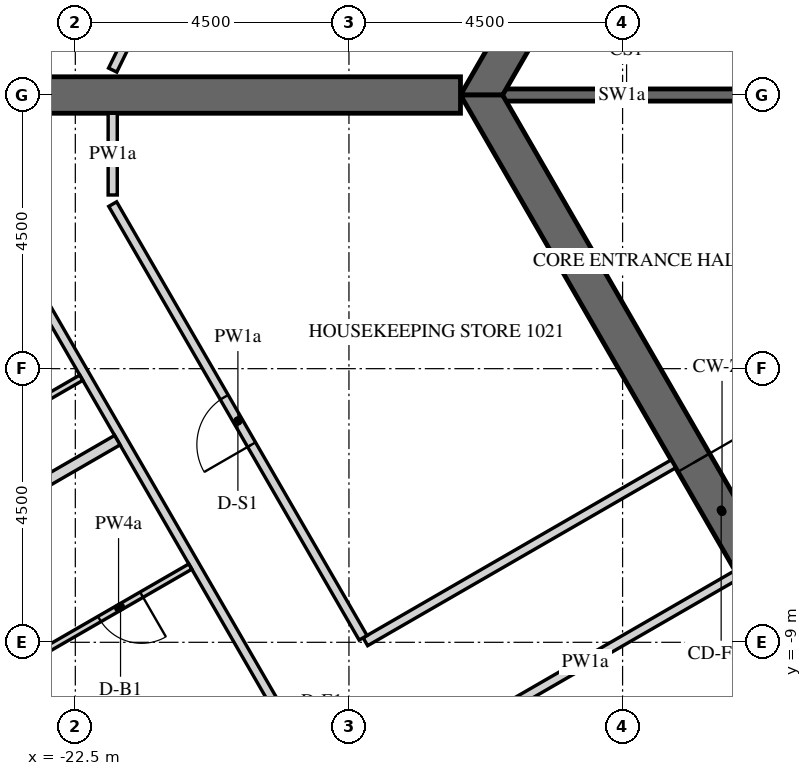
"""IFC4 building model, lengths in metres.
Left out: names, types, materials, properties, quantities, classifications, styles, units other than length and angle.
Written with IfcOpenShell. Run it as: python <this file> out.ifc"""

import sys

from ifc_helpers import new_model, si_unit, direction, frame, frame_2d, origin, place, context, subcontext, project, spatial, polyline, rectangle, outline, extrude, element, fill, save


model = new_model("IFC4")
c1 = context("Model", 3, precision=1e-05, world=origin(), true_north=direction((0.0, 1.0)))
c2 = subcontext(c1, "Body", "Model", "MODEL_VIEW")
j1 = project(units=[si_unit("LENGTHUNIT", "METRE"), si_unit("PLANEANGLEUNIT", "RADIAN")], contexts=[c1])
p1 = place(None, origin())
s1 = spatial("IfcSite", under=j1, at=p1, CompositionType="ELEMENT")
p2 = place(p1, origin())
s2 = spatial("IfcBuilding", under=s1, at=p2, CompositionType="ELEMENT")
p3 = place(p2, frame((0.0, 0.0, 135.0)))
s3 = spatial("IfcBuildingStorey", under=s2, at=p3, CompositionType="ELEMENT", Elevation=135.0)
p4 = place(p3, frame((-19.595, 27.633, -0.15), z_axis=(0.0, 0.0, 1.0), x_axis=(-0.438368285794, -0.898795441694, 0.0)))
e1 = element("IfcWall", 1, at=p4, inside=s3, PredefinedType="SOLIDWALL", context=c2, shape_type="SweptSolid", body=[
    extrude(outline(polyline([(-0.026, -0.275), (30.093, -0.275), (30.048, 0.275), (0.026, 0.275), (-0.026, -0.275)])), origin(), (0.0, 0.0, 1.0), 3.9),
])
p5 = place(p4, frame((1.236, 0.0, 1.05)))
e2 = element("IfcOpeningElement", 2, at=p5, cuts=e1, PredefinedType="OPENING", context=c2, shape_type="SweptSolid", body=[
    extrude(rectangle(XDim=2.4, YDim=2.4, at=frame_2d((1.2, 1.2))), frame((0.0, 0.285, 0.0), z_axis=(0.0, -1.0, 0.0), x_axis=(1.0, 0.0, 0.0)), (0.0, 0.0, 1.0), 0.57),
])
p6 = place(p4, frame((4.835, 0.0, 1.05)))
e3 = element("IfcOpeningElement", 3, at=p6, cuts=e1, PredefinedType="OPENING", context=c2, shape_type="SweptSolid", body=[
    extrude(rectangle(XDim=2.4, YDim=2.4, at=frame_2d((1.2, 1.2))), frame((0.0, 0.285, 0.0), z_axis=(0.0, -1.0, 0.0), x_axis=(1.0, 0.0, 0.0)), (0.0, 0.0, 1.0), 0.57),
])
p7 = place(p4, frame((8.436, 0.0, 1.05)))
e4 = element("IfcOpeningElement", 4, at=p7, cuts=e1, PredefinedType="OPENING", context=c2, shape_type="SweptSolid", body=[
    extrude(rectangle(XDim=2.4, YDim=2.4, at=frame_2d((1.2, 1.2))), frame((0.0, 0.285, 0.0), z_axis=(0.0, -1.0, 0.0), x_axis=(1.0, 0.0, 0.0)), (0.0, 0.0, 1.0), 0.57),
])
p8 = place(p4, frame((12.035, 0.0, 1.05)))
e5 = element("IfcOpeningElement", 5, at=p8, cuts=e1, PredefinedType="OPENING", context=c2, shape_type="SweptSolid", body=[
    extrude(rectangle(XDim=2.4, YDim=2.4, at=frame_2d((1.2, 1.2))), frame((0.0, 0.285, 0.0), z_axis=(0.0, -1.0, 0.0), x_axis=(1.0, 0.0, 0.0)), (0.0, 0.0, 1.0), 0.57),
])
p9 = place(p4, frame((15.635, 0.0, 1.05)))
e6 = element("IfcOpeningElement", 6, at=p9, cuts=e1, PredefinedType="OPENING", context=c2, shape_type="SweptSolid", body=[
    extrude(rectangle(XDim=2.4, YDim=2.4, at=frame_2d((1.2, 1.2))), frame((0.0, 0.285, 0.0), z_axis=(0.0, -1.0, 0.0), x_axis=(1.0, 0.0, 0.0)), (0.0, 0.0, 1.0), 0.57),
])
p10 = place(p4, frame((19.236, 0.0, 1.05)))
e7 = element("IfcOpeningElement", 7, at=p10, cuts=e1, PredefinedType="OPENING", context=c2, shape_type="SweptSolid", body=[
    extrude(rectangle(XDim=2.4, YDim=2.4, at=frame_2d((1.2, 1.2))), frame((0.0, 0.285, 0.0), z_axis=(0.0, -1.0, 0.0), x_axis=(1.0, 0.0, 0.0)), (0.0, 0.0, 1.0), 0.57),
])
p11 = place(p4, frame((22.835, 0.0, 1.05)))
e8 = element("IfcOpeningElement", 8, at=p11, cuts=e1, PredefinedType="OPENING", context=c2, shape_type="SweptSolid", body=[
    extrude(rectangle(XDim=2.4, YDim=2.4, at=frame_2d((1.2, 1.2))), frame((0.0, 0.285, 0.0), z_axis=(0.0, -1.0, 0.0), x_axis=(1.0, 0.0, 0.0)), (0.0, 0.0, 1.0), 0.57),
])
p12 = place(p4, frame((26.436, 0.0, 1.05)))
e9 = element("IfcOpeningElement", 9, at=p12, cuts=e1, PredefinedType="OPENING", context=c2, shape_type="SweptSolid", body=[
    extrude(rectangle(XDim=2.4, YDim=2.4, at=frame_2d((1.2, 1.2))), frame((0.0, 0.285, 0.0), z_axis=(0.0, -1.0, 0.0), x_axis=(1.0, 0.0, 0.0)), (0.0, 0.0, 1.0), 0.57),
])
p13 = place(p3, frame((-32.655, -2.89, -0.15), z_axis=(0.0, 0.0, 1.0), x_axis=(0.499997711317, -0.866026725152, 0.0)))
e10 = element("IfcWall", 10, at=p13, inside=s3, PredefinedType="SOLIDWALL", context=c2, shape_type="SweptSolid", body=[
    extrude(outline(polyline([(-0.022, -0.275), (30.097, -0.275), (30.045, 0.275), (0.022, 0.275), (-0.022, -0.275)])), origin(), (0.0, 0.0, 1.0), 3.9),
])
p14 = place(p13, frame((1.236, 0.0, 1.05)))
e11 = element("IfcOpeningElement", 11, at=p14, cuts=e10, PredefinedType="OPENING", context=c2, shape_type="SweptSolid", body=[
    extrude(rectangle(XDim=2.4, YDim=2.4, at=frame_2d((1.2, 1.2))), frame((0.0, 0.285, 0.0), z_axis=(0.0, -1.0, 0.0), x_axis=(1.0, 0.0, 0.0)), (0.0, 0.0, 1.0), 0.57),
])
p15 = place(p13, frame((4.835, 0.0, 1.05)))
e12 = element("IfcOpeningElement", 12, at=p15, cuts=e10, PredefinedType="OPENING", context=c2, shape_type="SweptSolid", body=[
    extrude(rectangle(XDim=2.4, YDim=2.4, at=frame_2d((1.2, 1.2))), frame((0.0, 0.285, 0.0), z_axis=(0.0, -1.0, 0.0), x_axis=(1.0, 0.0, 0.0)), (0.0, 0.0, 1.0), 0.57),
])
p16 = place(p13, frame((8.436, 0.0, 1.05)))
e13 = element("IfcOpeningElement", 13, at=p16, cuts=e10, PredefinedType="OPENING", context=c2, shape_type="SweptSolid", body=[
    extrude(rectangle(XDim=2.4, YDim=2.4, at=frame_2d((1.2, 1.2))), frame((0.0, 0.285, 0.0), z_axis=(0.0, -1.0, 0.0), x_axis=(1.0, 0.0, 0.0)), (0.0, 0.0, 1.0), 0.57),
])
p17 = place(p13, frame((12.035, 0.0, 1.05)))
e14 = element("IfcOpeningElement", 14, at=p17, cuts=e10, PredefinedType="OPENING", context=c2, shape_type="SweptSolid", body=[
    extrude(rectangle(XDim=2.4, YDim=2.4, at=frame_2d((1.2, 1.2))), frame((0.0, 0.285, 0.0), z_axis=(0.0, -1.0, 0.0), x_axis=(1.0, 0.0, 0.0)), (0.0, 0.0, 1.0), 0.57),
])
p18 = place(p13, frame((15.635, 0.0, 1.05)))
e15 = element("IfcOpeningElement", 15, at=p18, cuts=e10, PredefinedType="OPENING", context=c2, shape_type="SweptSolid", body=[
    extrude(rectangle(XDim=2.4, YDim=2.4, at=frame_2d((1.2, 1.2))), frame((0.0, 0.285, 0.0), z_axis=(0.0, -1.0, 0.0), x_axis=(1.0, 0.0, 0.0)), (0.0, 0.0, 1.0), 0.57),
])
p19 = place(p13, frame((19.236, 0.0, 1.05)))
e16 = element("IfcOpeningElement", 16, at=p19, cuts=e10, PredefinedType="OPENING", context=c2, shape_type="SweptSolid", body=[
    extrude(rectangle(XDim=2.4, YDim=2.4, at=frame_2d((1.2, 1.2))), frame((0.0, 0.285, 0.0), z_axis=(0.0, -1.0, 0.0), x_axis=(1.0, 0.0, 0.0)), (0.0, 0.0, 1.0), 0.57),
])
p20 = place(p13, frame((22.835, 0.0, 1.05)))
e17 = element("IfcOpeningElement", 17, at=p20, cuts=e10, PredefinedType="OPENING", context=c2, shape_type="SweptSolid", body=[
    extrude(rectangle(XDim=2.4, YDim=2.4, at=frame_2d((1.2, 1.2))), frame((0.0, 0.285, 0.0), z_axis=(0.0, -1.0, 0.0), x_axis=(1.0, 0.0, 0.0)), (0.0, 0.0, 1.0), 0.57),
])
p21 = place(p13, frame((26.436, 0.0, 1.05)))
e18 = element("IfcOpeningElement", 18, at=p21, cuts=e10, PredefinedType="OPENING", context=c2, shape_type="SweptSolid", body=[
    extrude(rectangle(XDim=2.4, YDim=2.4, at=frame_2d((1.2, 1.2))), frame((0.0, 0.285, 0.0), z_axis=(0.0, -1.0, 0.0), x_axis=(1.0, 0.0, 0.0)), (0.0, 0.0, 1.0), 0.57),
])
p22 = place(p3, frame((-7.91, 13.7, -0.15), z_axis=(0.0, 0.0, 1.0), x_axis=(-0.499999880136, -0.866025472988, 0.0)))
e19 = element("IfcWall", 19, at=p22, inside=s3, PredefinedType="SHEAR", context=c2, shape_type="SweptSolid", body=[
    extrude(outline(polyline([(-0.173, -0.3), (15.993, -0.3), (15.646, 0.3), (0.173, 0.3), (-0.173, -0.3)])), origin(), (0.0, 0.0, 1.0), 3.9),
])
p23 = place(p22, frame((7.039, 0.0, 0.15)))
e20 = element("IfcOpeningElement", 20, at=p23, cuts=e19, PredefinedType="OPENING", context=c2, shape_type="SweptSolid", body=[
    extrude(rectangle(XDim=1.8, YDim=2.4, at=frame_2d((0.9, 1.2))), frame((0.0, 0.31, 0.0), z_axis=(0.0, -1.0, 0.0), x_axis=(1.0, 0.0, 0.0)), (0.0, 0.0, 1.0), 0.62),
])
p24 = place(p3, frame((-15.819, 0.0, -0.15), z_axis=(0.0, 0.0, 1.0), x_axis=(0.499999880136, -0.866025472988, 0.0)))
e21 = element("IfcWall", 21, at=p24, inside=s3, PredefinedType="SHEAR", context=c2, shape_type="SweptSolid", body=[
    extrude(outline(polyline([(-0.173, -0.3), (15.993, -0.3), (15.646, 0.3), (0.173, 0.3), (-0.173, -0.3)])), origin(), (0.0, 0.0, 1.0), 3.9),
])
p25 = place(p24, frame((6.981, 0.0, 0.15)))
e22 = element("IfcOpeningElement", 22, at=p25, cuts=e21, PredefinedType="OPENING", context=c2, shape_type="SweptSolid", body=[
    extrude(rectangle(XDim=1.8, YDim=2.4, at=frame_2d((0.9, 1.2))), frame((0.0, 0.31, 0.0), z_axis=(0.0, -1.0, 0.0), x_axis=(1.0, 0.0, 0.0)), (0.0, 0.0, 1.0), 0.62),
])
p26 = place(p3, frame((-16.166, 0.0, -0.15), z_axis=(0.0, 0.0, 1.0), x_axis=(-1.0, 0.0, 0.0)))
e23 = element("IfcWall", 23, at=p26, inside=s3, PredefinedType="SHEAR", context=c2, shape_type="SweptSolid", body=[
    extrude(rectangle(XDim=16.509, YDim=0.6, at=frame_2d((8.254, 0.0))), origin(), (0.0, 0.0, 1.0), 3.9),
])
p27 = place(p26, frame((7.354, 0.0, 0.15)))
e24 = element("IfcOpeningElement", 24, at=p27, cuts=e23, PredefinedType="OPENING", context=c2, shape_type="SweptSolid", body=[
    extrude(rectangle(XDim=1.8, YDim=2.4, at=frame_2d((0.9, 1.2))), frame((0.0, 0.31, 0.0), z_axis=(0.0, -1.0, 0.0), x_axis=(1.0, 0.0, 0.0)), (0.0, 0.0, 1.0), 0.62),
])
p28 = place(p3, frame((-11.547, 0.0, -0.15), z_axis=(0.0, 0.0, 1.0), x_axis=(-1.0, 0.0, 0.0)))
e25 = element("IfcWall", 25, at=p28, inside=s3, PredefinedType="SHEAR", context=c2, shape_type="SweptSolid", body=[
    extrude(rectangle(XDim=3.926, YDim=0.2, at=frame_2d((1.963, 0.0))), origin(), (0.0, 0.0, 1.0), 3.9),
])
p29 = place(p3, frame((-21.885, 0.41, 0.0), z_axis=(0.0, 0.0, 1.0), x_axis=(0.43837064471, 0.898794291179, 0.0)))
e26 = element("IfcWall", 26, at=p29, inside=s3, PredefinedType="PARTITIONING", context=c2, shape_type="SweptSolid", body=[
    extrude(rectangle(XDim=9.532, YDim=0.15, at=frame_2d((4.766, 0.0))), origin(), (0.0, 0.0, 1.0), 2.838),
])
p30 = place(p29, frame((4.316, 0.0, 0.0)))
e27 = element("IfcOpeningElement", 27, at=p30, cuts=e26, PredefinedType="OPENING", context=c2, shape_type="SweptSolid", body=[
    extrude(rectangle(XDim=0.9, YDim=2.1, at=frame_2d((0.45, 1.05))), frame((0.0, 0.085, 0.0), z_axis=(0.0, -1.0, 0.0), x_axis=(1.0, 0.0, 0.0)), (0.0, 0.0, 1.0), 0.17),
])
p31 = place(p3, frame((-23.743, -2.175, 0.0), z_axis=(0.0, 0.0, 1.0), x_axis=(0.499992353047, -0.86602981871, 0.0)))
e28 = element("IfcWall", 28, at=p31, inside=s3, PredefinedType="PARTITIONING", context=c2, shape_type="SweptSolid", body=[
    extrude(rectangle(XDim=23.516, YDim=0.15, at=frame_2d((11.758, 0.0))), origin(), (0.0, 0.0, 1.0), 2.838),
])
p32 = place(p31, frame((10.099, 0.0, 0.0)))
e29 = element("IfcOpeningElement", 29, at=p32, cuts=e28, PredefinedType="OPENING", context=c2, shape_type="SweptSolid", body=[
    extrude(rectangle(XDim=1.0, YDim=2.1, at=frame_2d((0.5, 1.05))), frame((0.0, 0.085, 0.0), z_axis=(0.0, -1.0, 0.0), x_axis=(1.0, 0.0, 0.0)), (0.0, 0.0, 1.0), 0.17),
])
p33 = place(p31, frame((17.358, 0.0, 0.0)))
e30 = element("IfcOpeningElement", 30, at=p33, cuts=e28, PredefinedType="OPENING", context=c2, shape_type="SweptSolid", body=[
    extrude(rectangle(XDim=1.0, YDim=2.1, at=frame_2d((0.5, 1.05))), frame((0.0, 0.085, 0.0), z_axis=(0.0, -1.0, 0.0), x_axis=(1.0, 0.0, 0.0)), (0.0, 0.0, 1.0), 0.17),
])
p34 = place(p3, frame((-12.664, -6.066, 0.0), z_axis=(0.0, 0.0, 1.0), x_axis=(-0.866018092707, -0.500012662943, 0.0)))
e31 = element("IfcWall", 31, at=p34, inside=s3, PredefinedType="PARTITIONING", context=c2, shape_type="SweptSolid", body=[
    extrude(rectangle(XDim=5.85, YDim=0.15, at=frame_2d((2.925, 0.0))), origin(), (0.0, 0.0, 1.0), 2.838),
])
p35 = place(p3, frame((-17.768, -8.926, 0.0), z_axis=(0.0, 0.0, 1.0), x_axis=(-0.499997033681, 0.866027116383, 0.0)))
e32 = element("IfcWall", 32, at=p35, inside=s3, PredefinedType="PARTITIONING", context=c2, shape_type="SweptSolid", body=[
    extrude(rectangle(XDim=8.235, YDim=0.15, at=frame_2d((4.118, 0.0))), origin(), (0.0, 0.0, 1.0), 2.838),
])
p36 = place(p35, frame((3.668, 0.0, 0.0)))
e33 = element("IfcOpeningElement", 33, at=p36, cuts=e32, PredefinedType="OPENING", context=c2, shape_type="SweptSolid", body=[
    extrude(rectangle(XDim=0.9, YDim=2.1, at=frame_2d((0.45, 1.05))), frame((0.0, 0.085, 0.0), z_axis=(0.0, -1.0, 0.0), x_axis=(1.0, 0.0, 0.0)), (0.0, 0.0, 1.0), 0.17),
])
p37 = place(p3, frame((-21.885, -1.644, 0.0), z_axis=(0.0, 0.0, 1.0), x_axis=(0.0, 1.0, 0.0)))
e34 = element("IfcWall", 34, at=p37, inside=s3, PredefinedType="PARTITIONING", context=c2, shape_type="SweptSolid", body=[
    extrude(rectangle(XDim=1.344, YDim=0.15, at=frame_2d((0.672, 0.0))), origin(), (0.0, 0.0, 1.0), 2.838),
])
p38 = place(p3, frame((-16.615, -10.772, 0.0), z_axis=(0.0, 0.0, 1.0), x_axis=(0.866025774745, 0.499999357477, 0.0)))
e35 = element("IfcWall", 35, at=p38, inside=s3, PredefinedType="PARTITIONING", context=c2, shape_type="SweptSolid", body=[
    extrude(rectangle(XDim=5.775, YDim=0.15, at=frame_2d((2.887, 0.0))), origin(), (0.0, 0.0, 1.0), 2.838),
])
p39 = place(p3, frame((-22.402, -4.649, 0.0), z_axis=(0.0, 0.0, 1.0), x_axis=(-0.865989585315, -0.500062034277, 0.0)))
e36 = element("IfcWall", 36, at=p39, inside=s3, PredefinedType="PARTITIONING", context=c2, shape_type="SweptSolid", body=[
    extrude(rectangle(XDim=2.925, YDim=0.1, at=frame_2d((1.462, 0.0))), origin(), (0.0, 0.0, 1.0), 2.838),
])
p40 = place(p39, frame((1.175, 0.0, 0.0)))
e37 = element("IfcOpeningElement", 37, at=p40, cuts=e36, PredefinedType="OPENING", context=c2, shape_type="SweptSolid", body=[
    extrude(rectangle(XDim=0.8, YDim=2.1, at=frame_2d((0.4, 1.05))), frame((0.0, 0.06, 0.0), z_axis=(0.0, -1.0, 0.0), x_axis=(1.0, 0.0, 0.0)), (0.0, 0.0, 1.0), 0.12),
])
p41 = place(p3, frame((-28.499, -9.538, 0.0), z_axis=(0.0, 0.0, 1.0), x_axis=(0.866040859435, 0.499973229072, 0.0)))
e38 = element("IfcWall", 38, at=p41, inside=s3, PredefinedType="PARTITIONING", context=c2, shape_type="SweptSolid", body=[
    extrude(rectangle(XDim=7.725, YDim=0.18, at=frame_2d((3.863, 0.0))), origin(), (0.0, 0.0, 1.0), 2.838),
])
p42 = place(p3, frame((-20.609, -7.754, 0.0), z_axis=(0.0, 0.0, 1.0), x_axis=(-0.866012511928, -0.500022328685, 0.0)))
e39 = element("IfcWall", 39, at=p42, inside=s3, PredefinedType="PARTITIONING", context=c2, shape_type="SweptSolid", body=[
    extrude(rectangle(XDim=2.725, YDim=0.1, at=frame_2d((1.363, 0.0))), origin(), (0.0, 0.0, 1.0), 2.838),
])
p43 = place(p42, frame((0.925, 0.0, 0.0)))
e40 = element("IfcOpeningElement", 40, at=p43, cuts=e39, PredefinedType="OPENING", context=c2, shape_type="SweptSolid", body=[
    extrude(rectangle(XDim=0.8, YDim=2.1, at=frame_2d((0.4, 1.05))), frame((0.0, 0.06, 0.0), z_axis=(0.0, -1.0, 0.0), x_axis=(1.0, 0.0, 0.0)), (0.0, 0.0, 1.0), 0.12),
])
p44 = place(p25, origin())
e41 = element("IfcDoor", 41, at=p44, inside=s3, OperationType="DOUBLE_DOOR_SINGLE_SWING", PredefinedType="DOOR", context=c2, shape_type="SweptSolid", body=[
    extrude(rectangle(XDim=1.8, YDim=2.4, at=frame_2d((0.9, 1.2))), frame((0.0, 0.025, 0.0), z_axis=(0.0, -1.0, 0.0), x_axis=(1.0, 0.0, 0.0)), (0.0, 0.0, 1.0), 0.05),
])
fill(e22, e41)
p45 = place(p43, origin())
e42 = element("IfcDoor", 42, at=p45, inside=s3, OperationType="SINGLE_SWING_RIGHT", PredefinedType="DOOR", context=c2, shape_type="SweptSolid", body=[
    extrude(rectangle(XDim=0.8, YDim=2.1, at=frame_2d((0.4, 1.05))), frame((0.0, 0.025, 0.0), z_axis=(0.0, -1.0, 0.0), x_axis=(1.0, 0.0, 0.0)), (0.0, 0.0, 1.0), 0.05),
])
fill(e40, e42)
p46 = place(p36, origin())
e43 = element("IfcDoor", 43, at=p46, inside=s3, OperationType="SINGLE_SWING_RIGHT", PredefinedType="DOOR", context=c2, shape_type="SweptSolid", body=[
    extrude(rectangle(XDim=0.9, YDim=2.1, at=frame_2d((0.45, 1.05))), frame((0.0, 0.025, 0.0), z_axis=(0.0, -1.0, 0.0), x_axis=(1.0, 0.0, 0.0)), (0.0, 0.0, 1.0), 0.05),
])
fill(e33, e43)
save(model, sys.argv[1])
